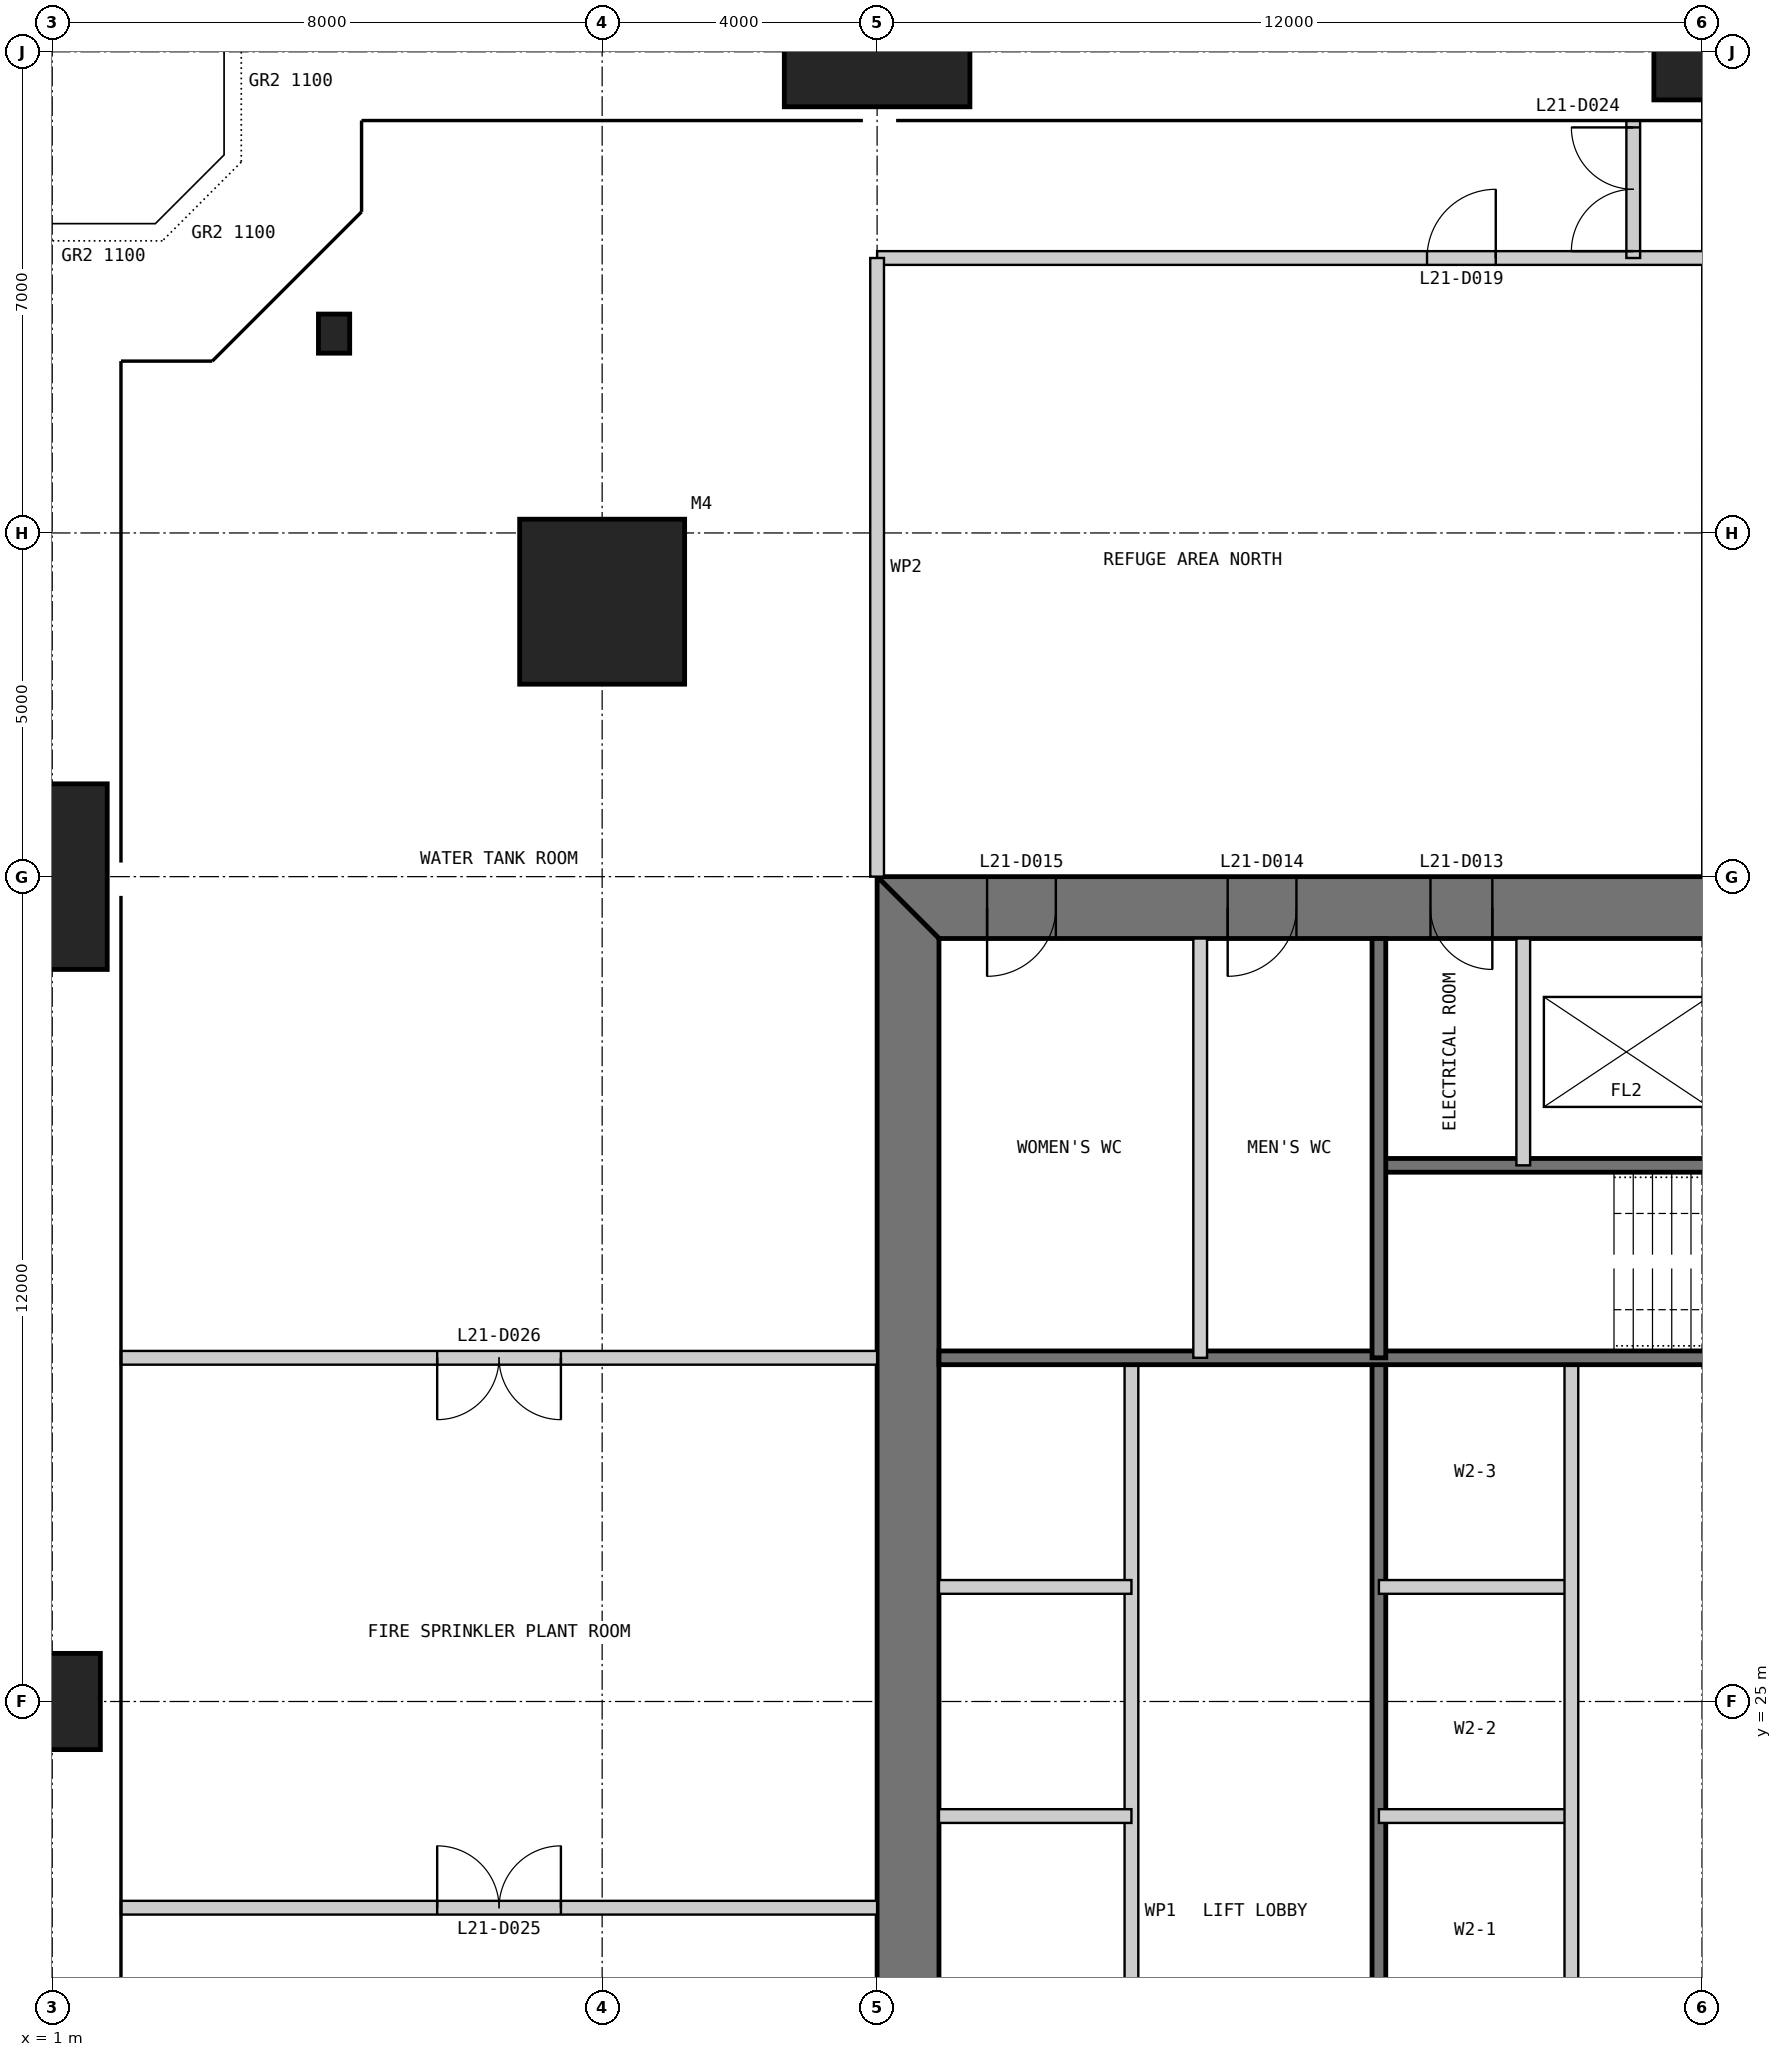
"""IFC4 building model, lengths in metres.
Left out: names, types, materials, properties, quantities, classifications, styles, units other than length and angle.
Written with IfcOpenShell. Run it as: python <this file> out.ifc"""

import sys

from ifc_helpers import new_model, si_unit, direction, frame, frame_2d, origin, origin_2d, place, context, subcontext, project, spatial, polyline, rectangle, i_section, outline, extrude, element, fill, save


model = new_model("IFC4")
c1 = context("Model", 3, precision=1e-05, world=origin(), true_north=direction((0.0, 1.0)))
c2 = subcontext(c1, "Body", "Model", "MODEL_VIEW")
j1 = project(units=[si_unit("LENGTHUNIT", "METRE"), si_unit("PLANEANGLEUNIT", "RADIAN")], contexts=[c1])
p1 = place(None, origin())
s1 = spatial("IfcSite", under=j1, at=p1, CompositionType="ELEMENT")
p2 = place(p1, origin())
s2 = spatial("IfcBuilding", under=s1, at=p2, CompositionType="ELEMENT")
p3 = place(p2, frame((0.0, 0.0, 91.0)))
s3 = spatial("IfcBuildingStorey", under=s2, at=p3, CompositionType="ELEMENT", Elevation=91.0)
p4 = place(p3, frame((9.0, 41.0, 0.0), z_axis=(0.0, 0.0, 1.0), x_axis=(1.0, 0.0, 0.0)))
e1 = element("IfcColumn", 1, at=p4, inside=s3, PredefinedType="COLUMN", context=c2, shape_type="SweptSolid", body=[
    extrude(rectangle(XDim=2.4, YDim=2.4, at=origin_2d()), origin(), (0.0, 0.0, 1.0), 6.0),
])
p5 = place(p3, frame((25.0, 49.0, 0.0), z_axis=(0.0, 0.0, 1.0), x_axis=(1.0, 0.0, 0.0)))
e2 = element("IfcColumn", 2, at=p5, inside=s3, PredefinedType="COLUMN", context=c2, shape_type="SweptSolid", body=[
    extrude(rectangle(XDim=1.4, YDim=1.4, at=origin_2d()), origin(), (0.0, 0.0, 1.0), 6.0),
])
p6 = place(p3, frame((13.0, 49.0, 0.0), z_axis=(0.0, 0.0, 1.0), x_axis=(1.0, 0.0, 0.0)))
e3 = element("IfcColumn", 3, at=p6, inside=s3, PredefinedType="COLUMN", context=c2, shape_type="SweptSolid", body=[
    extrude(rectangle(XDim=2.7, YDim=1.6, at=origin_2d()), origin(), (0.0, 0.0, 1.0), 6.0),
])
p7 = place(p3, frame((1.0, 37.0, 0.0), z_axis=(0.0, 0.0, 1.0), x_axis=(1.0, 0.0, 0.0)))
e4 = element("IfcColumn", 4, at=p7, inside=s3, PredefinedType="COLUMN", context=c2, shape_type="SweptSolid", body=[
    extrude(rectangle(XDim=1.6, YDim=2.7, at=origin_2d()), origin(), (0.0, 0.0, 1.0), 6.0),
])
p8 = place(p3, frame((1.0, 25.0, 0.0), z_axis=(0.0, 0.0, 1.0), x_axis=(1.0, 0.0, 0.0)))
e5 = element("IfcColumn", 5, at=p8, inside=s3, PredefinedType="COLUMN", context=c2, shape_type="SweptSolid", body=[
    extrude(rectangle(XDim=1.4, YDim=1.4, at=origin_2d()), origin(), (0.0, 0.0, 1.0), 6.0),
])
p9 = place(p3, frame((5.1, 44.9, 0.0), z_axis=(0.0, 0.0, 1.0), x_axis=(1.0, 0.0, 0.0)))
e6 = element("IfcColumn", 6, at=p9, inside=s3, PredefinedType="COLUMN", context=c2, shape_type="SweptSolid", body=[
    extrude(i_section(OverallWidth=0.455, OverallDepth=0.569, WebThickness=0.078, FlangeThickness=0.125, at=origin_2d()), origin(), (0.0, 0.0, 1.0), 4.6),
])
p10 = place(p3, frame((37.0, 36.55, 0.0), z_axis=(0.0, 0.0, 1.0), x_axis=(-1.0, 0.0, 0.0)))
e7 = element("IfcWall", 7, at=p10, inside=s3, PredefinedType="SHEAR", context=c2, shape_type="SweptSolid", body=[
    extrude(outline(polyline([(0.0, -0.45), (24.0, -0.45), (23.1, 0.45), (0.9, 0.45), (0.0, -0.45)])), origin(), (0.0, 0.0, 1.0), 6.0),
])
p11 = place(p10, frame((4.9, 0.0, 0.0)))
e8 = element("IfcOpeningElement", 8, at=p11, cuts=e7, PredefinedType="OPENING", context=c2, shape_type="SweptSolid", body=[
    extrude(rectangle(XDim=1.0, YDim=2.2, at=frame_2d((0.5, 1.1))), frame((0.0, 0.46, 0.0), z_axis=(0.0, -1.0, 0.0), x_axis=(1.0, 0.0, 0.0)), (0.0, 0.0, 1.0), 0.92),
])
p12 = place(p10, frame((8.9, 0.0, 0.0)))
e9 = element("IfcOpeningElement", 9, at=p12, cuts=e7, PredefinedType="OPENING", context=c2, shape_type="SweptSolid", body=[
    extrude(rectangle(XDim=1.1, YDim=2.2, at=frame_2d((0.55, 1.1))), frame((0.0, 0.46, 0.0), z_axis=(0.0, -1.0, 0.0), x_axis=(1.0, 0.0, 0.0)), (0.0, 0.0, 1.0), 0.92),
])
p13 = place(p10, frame((15.05, 0.0, 0.0)))
e10 = element("IfcOpeningElement", 10, at=p13, cuts=e7, PredefinedType="OPENING", context=c2, shape_type="SweptSolid", body=[
    extrude(rectangle(XDim=0.9, YDim=2.2, at=frame_2d((0.45, 1.1))), frame((0.0, 0.46, 0.0), z_axis=(0.0, -1.0, 0.0), x_axis=(1.0, 0.0, 0.0)), (0.0, 0.0, 1.0), 0.92),
])
p14 = place(p10, frame((17.9, 0.0, 0.0)))
e11 = element("IfcOpeningElement", 11, at=p14, cuts=e7, PredefinedType="OPENING", context=c2, shape_type="SweptSolid", body=[
    extrude(rectangle(XDim=1.0, YDim=2.2, at=frame_2d((0.5, 1.1))), frame((0.0, 0.46, 0.0), z_axis=(0.0, -1.0, 0.0), x_axis=(1.0, 0.0, 0.0)), (0.0, 0.0, 1.0), 0.92),
])
p15 = place(p10, frame((21.4, 0.0, 0.0)))
e12 = element("IfcOpeningElement", 12, at=p15, cuts=e7, PredefinedType="OPENING", context=c2, shape_type="SweptSolid", body=[
    extrude(rectangle(XDim=1.0, YDim=2.2, at=frame_2d((0.5, 1.1))), frame((0.0, 0.46, 0.0), z_axis=(0.0, -1.0, 0.0), x_axis=(1.0, 0.0, 0.0)), (0.0, 0.0, 1.0), 0.92),
])
p16 = place(p3, frame((13.45, 36.1, 0.0), z_axis=(0.0, 0.0, 1.0), x_axis=(0.0, -1.0, 0.0)))
e13 = element("IfcWall", 13, at=p16, inside=s3, PredefinedType="SHEAR", context=c2, shape_type="SweptSolid", body=[
    extrude(outline(polyline([(-0.9, -0.45), (23.1, -0.45), (22.2, 0.45), (0.0, 0.45), (-0.9, -0.45)])), origin(), (0.0, 0.0, 1.0), 6.0),
])
p17 = place(p16, frame((20.2, 0.0, 0.0)))
e14 = element("IfcOpeningElement", 14, at=p17, cuts=e13, PredefinedType="OPENING", context=c2, shape_type="SweptSolid", body=[
    extrude(rectangle(XDim=1.0, YDim=2.2, at=frame_2d((0.5, 1.1))), frame((0.0, 0.46, 0.0), z_axis=(0.0, -1.0, 0.0), x_axis=(1.0, 0.0, 0.0)), (0.0, 0.0, 1.0), 0.92),
])
p18 = place(p16, frame((17.25, 0.0, 0.0)))
e15 = element("IfcOpeningElement", 15, at=p18, cuts=e13, PredefinedType="OPENING", context=c2, shape_type="SweptSolid", body=[
    extrude(rectangle(XDim=0.9, YDim=2.2, at=frame_2d((0.45, 1.1))), frame((0.0, 0.46, 0.0), z_axis=(0.0, -1.0, 0.0), x_axis=(1.0, 0.0, 0.0)), (0.0, 0.0, 1.0), 0.92),
])
p19 = place(p3, frame((16.7, 13.9, 0.0), z_axis=(0.0, 0.0, 1.0), x_axis=(0.0, 1.0, 0.0)))
e16 = element("IfcWall", 16, at=p19, inside=s3, PredefinedType="PARTITIONING", context=c2, shape_type="SweptSolid", body=[
    extrude(rectangle(XDim=16.1, YDim=0.2, at=frame_2d((8.05, 0.0))), origin(), (0.0, 0.0, 1.0), 5.8),
])
p20 = place(p3, frame((20.3, 13.9, 0.0), z_axis=(0.0, 0.0, 1.0), x_axis=(0.0, 1.0, 0.0)))
e17 = element("IfcWall", 17, at=p20, inside=s3, PredefinedType="SOLIDWALL", context=c2, shape_type="SweptSolid", body=[
    extrude(rectangle(XDim=16.1, YDim=0.2, at=frame_2d((8.05, 0.0))), origin(), (0.0, 0.0, 1.0), 5.8),
])
for number, where, z_axis, x_axis in (
    (18, (13.9, 23.333, 0.0), (0.0, 0.0, 1.0), (1.0, 0.0, 0.0)),
    (19, (13.9, 26.667, 0.0), (0.0, 0.0, 1.0), (1.0, 0.0, 0.0)),
    (20, (20.3, 23.333, 0.0), (0.0, 0.0, 1.0), (1.0, 0.0, 0.0)),
    (21, (20.3, 26.667, 0.0), (0.0, 0.0, 1.0), (1.0, 0.0, 0.0)),
):
    element("IfcWall", number, at=place(p3, frame(where, z_axis=z_axis, x_axis=x_axis)), inside=s3, PredefinedType="PARTITIONING", context=c2, shape_type="SweptSolid", body=[
        extrude(rectangle(XDim=2.8, YDim=0.2, at=frame_2d((1.4, 0.0))), origin(), (0.0, 0.0, 1.0), 5.8),
    ])
p21 = place(p3, frame((23.1, 20.0, 0.0), z_axis=(0.0, 0.0, 1.0), x_axis=(0.0, 1.0, 0.0)))
e22 = element("IfcWall", 22, at=p21, inside=s3, PredefinedType="PARTITIONING", context=c2, shape_type="SweptSolid", body=[
    extrude(rectangle(XDim=10.0, YDim=0.2, at=frame_2d((5.0, 0.0))), origin(), (0.0, 0.0, 1.0), 5.8),
])
p22 = place(p3, frame((29.7, 32.8, 0.0), z_axis=(0.0, 0.0, 1.0), x_axis=(-1.0, 0.0, 0.0)))
e23 = element("IfcWall", 23, at=p22, inside=s3, PredefinedType="SOLIDWALL", context=c2, shape_type="SweptSolid", body=[
    extrude(rectangle(XDim=9.4, YDim=0.2, at=frame_2d((4.7, 0.0))), origin(), (0.0, 0.0, 1.0), 5.8),
])
p23 = place(p22, frame((0.25, 0.0, 0.0)))
e24 = element("IfcOpeningElement", 24, at=p23, cuts=e23, PredefinedType="OPENING", context=c2, shape_type="SweptSolid", body=[
    extrude(rectangle(XDim=1.0, YDim=2.2, at=frame_2d((0.5, 1.1))), frame((0.0, 0.11, 0.0), z_axis=(0.0, -1.0, 0.0), x_axis=(1.0, 0.0, 0.0)), (0.0, 0.0, 1.0), 0.22),
])
p24 = place(p3, frame((29.7, 30.0, 0.0), z_axis=(0.0, 0.0, 1.0), x_axis=(-1.0, 0.0, 0.0)))
e25 = element("IfcWall", 25, at=p24, inside=s3, PredefinedType="SOLIDWALL", context=c2, shape_type="SweptSolid", body=[
    extrude(rectangle(XDim=15.8, YDim=0.2, at=frame_2d((7.9, 0.0))), origin(), (0.0, 0.0, 1.0), 5.8),
])
p25 = place(p3, frame((22.4, 36.1, 0.0), z_axis=(0.0, 0.0, 1.0), x_axis=(0.0, -1.0, 0.0)))
e26 = element("IfcWall", 26, at=p25, inside=s3, PredefinedType="PARTITIONING", context=c2, shape_type="SweptSolid", body=[
    extrude(rectangle(XDim=3.3, YDim=0.2, at=frame_2d((1.65, 0.0))), origin(), (0.0, 0.0, 1.0), 5.8),
])
p26 = place(p3, frame((20.3, 36.1, 0.0), z_axis=(0.0, 0.0, 1.0), x_axis=(0.0, -1.0, 0.0)))
e27 = element("IfcWall", 27, at=p26, inside=s3, PredefinedType="SOLIDWALL", context=c2, shape_type="SweptSolid", body=[
    extrude(rectangle(XDim=6.1, YDim=0.2, at=frame_2d((3.05, 0.0))), origin(), (0.0, 0.0, 1.0), 5.8),
])
p27 = place(p3, frame((17.7, 36.1, 0.0), z_axis=(0.0, 0.0, 1.0), x_axis=(0.0, -1.0, 0.0)))
e28 = element("IfcWall", 28, at=p27, inside=s3, PredefinedType="PARTITIONING", context=c2, shape_type="SweptSolid", body=[
    extrude(rectangle(XDim=6.1, YDim=0.2, at=frame_2d((3.05, 0.0))), origin(), (0.0, 0.0, 1.0), 5.8),
])
p28 = place(p3, frame((13.0, 46.0, 0.0), z_axis=(0.0, 0.0, 1.0), x_axis=(1.0, 0.0, 0.0)))
e29 = element("IfcWall", 29, at=p28, inside=s3, PredefinedType="PARTITIONING", context=c2, shape_type="SweptSolid", body=[
    extrude(rectangle(XDim=24.0, YDim=0.2, at=frame_2d((12.0, 0.0))), origin(), (0.0, 0.0, 1.0), 5.8),
])
p29 = place(p28, frame((8.0, 0.0, 0.0)))
e30 = element("IfcOpeningElement", 30, at=p29, cuts=e29, PredefinedType="OPENING", context=c2, shape_type="SweptSolid", body=[
    extrude(rectangle(XDim=1.0, YDim=2.2, at=frame_2d((0.5, 1.1))), frame((0.0, 0.11, 0.0), z_axis=(0.0, -1.0, 0.0), x_axis=(1.0, 0.0, 0.0)), (0.0, 0.0, 1.0), 0.22),
])
p30 = place(p3, frame((13.0, 37.0, 0.0), z_axis=(0.0, 0.0, 1.0), x_axis=(0.0, 1.0, 0.0)))
e31 = element("IfcWall", 31, at=p30, inside=s3, PredefinedType="PARTITIONING", context=c2, shape_type="SweptSolid", body=[
    extrude(rectangle(XDim=9.0, YDim=0.2, at=frame_2d((4.5, 0.0))), origin(), (0.0, 0.0, 1.0), 4.853),
])
p31 = place(p3, frame((24.0, 46.0, 0.0), z_axis=(0.0, 0.0, 1.0), x_axis=(0.0, 1.0, 0.0)))
e32 = element("IfcWall", 32, at=p31, inside=s3, PredefinedType="PARTITIONING", context=c2, shape_type="SweptSolid", body=[
    extrude(rectangle(XDim=2.0, YDim=0.2, at=frame_2d((1.0, 0.0))), origin(), (0.0, 0.0, 1.0), 5.8),
])
p32 = place(p31, frame((0.1, 0.0, 0.0)))
e33 = element("IfcOpeningElement", 33, at=p32, cuts=e32, PredefinedType="OPENING", context=c2, shape_type="SweptSolid", body=[
    extrude(rectangle(XDim=1.8, YDim=2.4, at=frame_2d((0.9, 1.2))), frame((0.0, 0.11, 0.0), z_axis=(0.0, -1.0, 0.0), x_axis=(1.0, 0.0, 0.0)), (0.0, 0.0, 1.0), 0.22),
])
p33 = place(p3, frame((2.0, 22.0, 0.0), z_axis=(0.0, 0.0, 1.0), x_axis=(1.0, 0.0, 0.0)))
e34 = element("IfcWall", 34, at=p33, inside=s3, PredefinedType="PARTITIONING", context=c2, shape_type="SweptSolid", body=[
    extrude(rectangle(XDim=11.0, YDim=0.2, at=frame_2d((5.5, 0.0))), origin(), (0.0, 0.0, 1.0), 5.8),
])
p34 = place(p33, frame((4.6, 0.0, 0.0)))
e35 = element("IfcOpeningElement", 35, at=p34, cuts=e34, PredefinedType="OPENING", context=c2, shape_type="SweptSolid", body=[
    extrude(rectangle(XDim=1.8, YDim=2.4, at=frame_2d((0.9, 1.2))), frame((0.0, 0.11, 0.0), z_axis=(0.0, -1.0, 0.0), x_axis=(1.0, 0.0, 0.0)), (0.0, 0.0, 1.0), 0.22),
])
p35 = place(p3, frame((2.0, 30.0, 0.0), z_axis=(0.0, 0.0, 1.0), x_axis=(1.0, 0.0, 0.0)))
e36 = element("IfcWall", 36, at=p35, inside=s3, PredefinedType="PARTITIONING", context=c2, shape_type="SweptSolid", body=[
    extrude(rectangle(XDim=11.0, YDim=0.2, at=frame_2d((5.5, 0.0))), origin(), (0.0, 0.0, 1.0), 5.8),
])
p36 = place(p35, frame((4.6, 0.0, 0.0)))
e37 = element("IfcOpeningElement", 37, at=p36, cuts=e36, PredefinedType="OPENING", context=c2, shape_type="SweptSolid", body=[
    extrude(rectangle(XDim=1.8, YDim=2.4, at=frame_2d((0.9, 1.2))), frame((0.0, 0.11, 0.0), z_axis=(0.0, -1.0, 0.0), x_axis=(1.0, 0.0, 0.0)), (0.0, 0.0, 1.0), 0.22),
])
p37 = place(p13, origin())
e38 = element("IfcDoor", 38, at=p37, inside=s3, OperationType="SINGLE_SWING_LEFT", PredefinedType="DOOR", context=c2, shape_type="SweptSolid", body=[
    extrude(rectangle(XDim=0.9, YDim=2.2, at=frame_2d((0.45, 1.1))), frame((0.0, 0.025, 0.0), z_axis=(0.0, -1.0, 0.0), x_axis=(1.0, 0.0, 0.0)), (0.0, 0.0, 1.0), 0.05),
    extrude(outline(polyline([(0.0, 0.0), (0.04, 0.0), (0.04, 2.16), (0.86, 2.16), (0.86, 0.0), (0.9, 0.0), (0.9, 2.2), (0.0, 2.2), (0.0, 0.0)])), frame((0.0, 0.3, 0.0), z_axis=(0.0, -1.0, 0.0), x_axis=(1.0, 0.0, 0.0)), (0.0, 0.0, 1.0), 0.6),
])
fill(e10, e38)
p38 = place(p14, origin())
e39 = element("IfcDoor", 39, at=p38, inside=s3, OperationType="SINGLE_SWING_RIGHT", PredefinedType="DOOR", context=c2, shape_type="SweptSolid", body=[
    extrude(rectangle(XDim=1.0, YDim=2.2, at=frame_2d((0.5, 1.1))), frame((0.0, 0.025, 0.0), z_axis=(0.0, -1.0, 0.0), x_axis=(1.0, 0.0, 0.0)), (0.0, 0.0, 1.0), 0.05),
    extrude(outline(polyline([(0.0, 0.0), (0.04, 0.0), (0.04, 2.16), (0.96, 2.16), (0.96, 0.0), (1.0, 0.0), (1.0, 2.2), (0.0, 2.2), (0.0, 0.0)])), frame((0.0, 0.3, 0.0), z_axis=(0.0, -1.0, 0.0), x_axis=(1.0, 0.0, 0.0)), (0.0, 0.0, 1.0), 0.6),
])
fill(e11, e39)
p39 = place(p15, origin())
e40 = element("IfcDoor", 40, at=p39, inside=s3, OperationType="SINGLE_SWING_RIGHT", PredefinedType="DOOR", context=c2, shape_type="SweptSolid", body=[
    extrude(rectangle(XDim=1.0, YDim=2.2, at=frame_2d((0.5, 1.1))), frame((0.0, 0.025, 0.0), z_axis=(0.0, -1.0, 0.0), x_axis=(1.0, 0.0, 0.0)), (0.0, 0.0, 1.0), 0.05),
    extrude(outline(polyline([(0.0, 0.0), (0.04, 0.0), (0.04, 2.16), (0.96, 2.16), (0.96, 0.0), (1.0, 0.0), (1.0, 2.2), (0.0, 2.2), (0.0, 0.0)])), frame((0.0, 0.3, 0.0), z_axis=(0.0, -1.0, 0.0), x_axis=(1.0, 0.0, 0.0)), (0.0, 0.0, 1.0), 0.6),
])
fill(e12, e40)
p40 = place(p29, origin())
e41 = element("IfcDoor", 41, at=p40, inside=s3, OperationType="SINGLE_SWING_RIGHT", PredefinedType="DOOR", context=c2, shape_type="SweptSolid", body=[
    extrude(rectangle(XDim=1.0, YDim=2.2, at=frame_2d((0.5, 1.1))), frame((0.0, 0.025, 0.0), z_axis=(0.0, -1.0, 0.0), x_axis=(1.0, 0.0, 0.0)), (0.0, 0.0, 1.0), 0.05),
])
fill(e30, e41)
p41 = place(p32, origin())
e42 = element("IfcDoor", 42, at=p41, inside=s3, OperationType="DOUBLE_DOOR_SINGLE_SWING", PredefinedType="DOOR", context=c2, shape_type="SweptSolid", body=[
    extrude(rectangle(XDim=1.8, YDim=2.4, at=frame_2d((0.9, 1.2))), frame((0.0, 0.025, 0.0), z_axis=(0.0, -1.0, 0.0), x_axis=(1.0, 0.0, 0.0)), (0.0, 0.0, 1.0), 0.05),
])
fill(e33, e42)
p42 = place(p34, origin())
e43 = element("IfcDoor", 43, at=p42, inside=s3, OperationType="DOUBLE_DOOR_SINGLE_SWING", PredefinedType="DOOR", context=c2, shape_type="SweptSolid", body=[
    extrude(rectangle(XDim=1.8, YDim=2.4, at=frame_2d((0.9, 1.2))), frame((0.0, 0.025, 0.0), z_axis=(0.0, -1.0, 0.0), x_axis=(1.0, 0.0, 0.0)), (0.0, 0.0, 1.0), 0.05),
])
fill(e35, e43)
p43 = place(p36, frame((1.8, 0.0, 0.0), z_axis=(0.0, 0.0, 1.0), x_axis=(-1.0, 0.0, 0.0)))
e44 = element("IfcDoor", 44, at=p43, inside=s3, OperationType="DOUBLE_DOOR_SINGLE_SWING", PredefinedType="DOOR", context=c2, shape_type="SweptSolid", body=[
    extrude(rectangle(XDim=1.8, YDim=2.4, at=frame_2d((0.9, 1.2))), frame((0.0, 0.025, 0.0), z_axis=(0.0, -1.0, 0.0), x_axis=(1.0, 0.0, 0.0)), (0.0, 0.0, 1.0), 0.05),
])
fill(e37, e44)
save(model, sys.argv[1])
